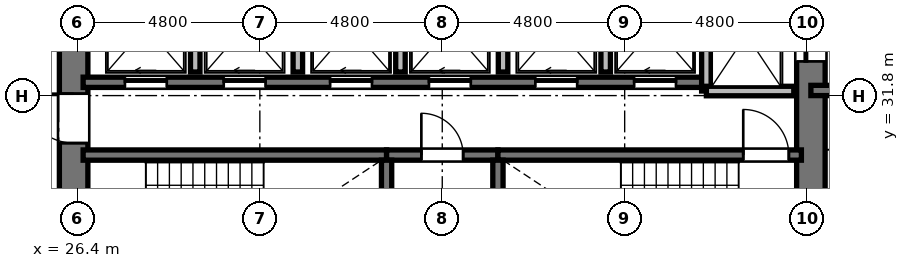
"""IFC4 building model, lengths in metres.
Left out: names, types, materials, properties, quantities, classifications, styles, units other than length and angle.
Written with IfcOpenShell. Run it as: python <this file> out.ifc"""

import sys

from ifc_helpers import new_model, si_unit, direction, frame, frame_2d, origin, place, context, subcontext, project, spatial, rectangle, extrude, element, fill, save


model = new_model("IFC4")
c1 = context("Model", 3, precision=1e-05, world=origin(), true_north=direction((0.0, 1.0)))
c2 = subcontext(c1, "Body", "Model", "MODEL_VIEW")
j1 = project(units=[si_unit("LENGTHUNIT", "METRE"), si_unit("PLANEANGLEUNIT", "RADIAN")], contexts=[c1])
p1 = place(None, origin())
s1 = spatial("IfcSite", under=j1, at=p1, CompositionType="ELEMENT")
p2 = place(p1, origin())
s2 = spatial("IfcBuilding", under=s1, at=p2, CompositionType="ELEMENT")
p3 = place(p2, frame((0.0, 0.0, 103.632)))
s3 = spatial("IfcBuildingStorey", under=s2, at=p3, CompositionType="ELEMENT", Elevation=103.632)
p4 = place(p3, frame((26.3, 20.95, 0.0), z_axis=(0.0, 0.0, 1.0), x_axis=(0.0, 1.0, 0.0)))
e1 = element("IfcWall", 1, at=p4, inside=s3, PredefinedType="SHEAR", context=c2, shape_type="SweptSolid", body=[
    extrude(rectangle(XDim=14.1, YDim=0.75, at=frame_2d((7.05, 0.0))), origin(), (0.0, 0.0, 1.0), 3.648),
])
p5 = place(p4, frame((6.5, 0.0, 0.0)))
e2 = element("IfcOpeningElement", 2, at=p5, cuts=e1, PredefinedType="OPENING", context=c2, shape_type="SweptSolid", body=[
    extrude(rectangle(XDim=1.2, YDim=2.15, at=frame_2d((0.6, 1.075))), frame((0.0, 0.385, 0.0), z_axis=(0.0, -1.0, 0.0), x_axis=(1.0, 0.0, 0.0)), (0.0, 0.0, 1.0), 0.77),
])
p6 = place(p4, frame((9.6, 0.0, 0.0)))
e3 = element("IfcOpeningElement", 3, at=p6, cuts=e1, PredefinedType="OPENING", context=c2, shape_type="SweptSolid", body=[
    extrude(rectangle(XDim=1.3, YDim=2.2, at=frame_2d((0.65, 1.1))), frame((0.0, 0.385, 0.0), z_axis=(0.0, -1.0, 0.0), x_axis=(1.0, 0.0, 0.0)), (0.0, 0.0, 1.0), 0.77),
])
p7 = place(p4, frame((3.26, 0.0, 0.0)))
e4 = element("IfcOpeningElement", 4, at=p7, cuts=e1, PredefinedType="OPENING", context=c2, shape_type="SweptSolid", body=[
    extrude(rectangle(XDim=1.3, YDim=2.2, at=frame_2d((0.65, 1.1))), frame((0.0, 0.385, 0.0), z_axis=(0.0, -1.0, 0.0), x_axis=(1.0, 0.0, 0.0)), (0.0, 0.0, 1.0), 0.77),
])
p8 = place(p3, frame((45.7, 20.95, 0.0), z_axis=(0.0, 0.0, 1.0), x_axis=(0.0, 1.0, 0.0)))
e5 = element("IfcWall", 5, at=p8, inside=s3, PredefinedType="SHEAR", context=c2, shape_type="SweptSolid", body=[
    extrude(rectangle(XDim=14.1, YDim=0.75, at=frame_2d((7.05, 0.0))), origin(), (0.0, 0.0, 1.0), 3.648),
])
p9 = place(p8, frame((11.75, 0.0, 0.0)))
e6 = element("IfcOpeningElement", 6, at=p9, cuts=e5, PredefinedType="OPENING", context=c2, shape_type="SweptSolid", body=[
    extrude(rectangle(XDim=1.4, YDim=2.3, at=frame_2d((0.7, 1.15))), frame((0.0, 0.385, 0.0), z_axis=(0.0, -1.0, 0.0), x_axis=(1.0, 0.0, 0.0)), (0.0, 0.0, 1.0), 0.77),
])
p10 = place(p8, frame((0.95, 0.0, 0.0)))
e7 = element("IfcOpeningElement", 7, at=p10, cuts=e5, PredefinedType="OPENING", context=c2, shape_type="SweptSolid", body=[
    extrude(rectangle(XDim=1.4, YDim=2.3, at=frame_2d((0.7, 1.15))), frame((0.0, 0.385, 0.0), z_axis=(0.0, -1.0, 0.0), x_axis=(1.0, 0.0, 0.0)), (0.0, 0.0, 1.0), 0.77),
])
p11 = place(p3, frame((26.55, 30.235, 0.0), z_axis=(0.0, 0.0, 1.0), x_axis=(1.0, 0.0, 0.0)))
e8 = element("IfcWall", 8, at=p11, inside=s3, PredefinedType="SHEAR", context=c2, shape_type="SweptSolid", body=[
    extrude(rectangle(XDim=7.985, YDim=0.27, at=frame_2d((3.992, 0.0))), origin(), (0.0, 0.0, 1.0), 3.648),
])
p12 = place(p3, frame((34.535, 30.235, 0.0), z_axis=(0.0, 0.0, 1.0), x_axis=(1.0, 0.0, 0.0)))
e9 = element("IfcWall", 9, at=p12, inside=s3, PredefinedType="SHEAR", context=c2, shape_type="SweptSolid", body=[
    extrude(rectangle(XDim=2.93, YDim=0.27, at=frame_2d((1.465, 0.0))), origin(), (0.0, 0.0, 1.0), 3.648),
])
p13 = place(p12, frame((0.915, 0.0, 0.0)))
e10 = element("IfcOpeningElement", 10, at=p13, cuts=e9, PredefinedType="OPENING", context=c2, shape_type="SweptSolid", body=[
    extrude(rectangle(XDim=1.1, YDim=2.15, at=frame_2d((0.55, 1.075))), frame((0.0, 0.145, 0.0), z_axis=(0.0, -1.0, 0.0), x_axis=(1.0, 0.0, 0.0)), (0.0, 0.0, 1.0), 0.29),
])
p14 = place(p3, frame((37.465, 30.235, 0.0), z_axis=(0.0, 0.0, 1.0), x_axis=(1.0, 0.0, 0.0)))
e11 = element("IfcWall", 11, at=p14, inside=s3, PredefinedType="SHEAR", context=c2, shape_type="SweptSolid", body=[
    extrude(rectangle(XDim=7.985, YDim=0.27, at=frame_2d((3.992, 0.0))), origin(), (0.0, 0.0, 1.0), 3.648),
])
p15 = place(p14, frame((6.455, 0.0, 0.0)))
e12 = element("IfcOpeningElement", 12, at=p15, cuts=e11, PredefinedType="OPENING", context=c2, shape_type="SweptSolid", body=[
    extrude(rectangle(XDim=1.2, YDim=2.15, at=frame_2d((0.6, 1.075))), frame((0.0, 0.145, 0.0), z_axis=(0.0, -1.0, 0.0), x_axis=(1.0, 0.0, 0.0)), (0.0, 0.0, 1.0), 0.29),
])
for number, where, z_axis, x_axis in (
    (13, (34.535, 26.02, 0.0), (0.0, 0.0, 1.0), (0.0, 1.0, 0.0)),
    (14, (37.465, 26.02, 0.0), (0.0, 0.0, 1.0), (0.0, 1.0, 0.0)),
):
    element("IfcWall", number, at=place(p3, frame(where, z_axis=z_axis, x_axis=x_axis)), inside=s3, PredefinedType="SHEAR", context=c2, shape_type="SweptSolid", body=[
        extrude(rectangle(XDim=4.08, YDim=0.27, at=frame_2d((2.04, 0.0))), origin(), (0.0, 0.0, 1.0), 3.648),
    ])
p16 = place(p3, frame((26.55, 32.15, 0.0), z_axis=(0.0, 0.0, 1.0), x_axis=(1.0, 0.0, 0.0)))
e15 = element("IfcWall", 15, at=p16, inside=s3, PredefinedType="SHEAR", context=c2, shape_type="SweptSolid", body=[
    extrude(rectangle(XDim=16.4, YDim=0.27, at=frame_2d((8.2, 0.0))), origin(), (0.0, 0.0, 1.0), 3.648),
])
p17 = place(p16, frame((1.1, 0.0, 0.0)))
e16 = element("IfcOpeningElement", 16, at=p17, cuts=e15, PredefinedType="OPENING", context=c2, shape_type="SweptSolid", body=[
    extrude(rectangle(XDim=1.1, YDim=2.2, at=frame_2d((0.55, 1.1))), frame((0.0, 0.145, 0.0), z_axis=(0.0, -1.0, 0.0), x_axis=(1.0, 0.0, 0.0)), (0.0, 0.0, 1.0), 0.29),
])
p18 = place(p16, frame((3.7, 0.0, 0.0)))
e17 = element("IfcOpeningElement", 17, at=p18, cuts=e15, PredefinedType="OPENING", context=c2, shape_type="SweptSolid", body=[
    extrude(rectangle(XDim=1.1, YDim=2.2, at=frame_2d((0.55, 1.1))), frame((0.0, 0.145, 0.0), z_axis=(0.0, -1.0, 0.0), x_axis=(1.0, 0.0, 0.0)), (0.0, 0.0, 1.0), 0.29),
])
p19 = place(p16, frame((6.5, 0.0, 0.0)))
e18 = element("IfcOpeningElement", 18, at=p19, cuts=e15, PredefinedType="OPENING", context=c2, shape_type="SweptSolid", body=[
    extrude(rectangle(XDim=1.1, YDim=2.2, at=frame_2d((0.55, 1.1))), frame((0.0, 0.145, 0.0), z_axis=(0.0, -1.0, 0.0), x_axis=(1.0, 0.0, 0.0)), (0.0, 0.0, 1.0), 0.29),
])
p20 = place(p16, frame((9.1, 0.0, 0.0)))
e19 = element("IfcOpeningElement", 19, at=p20, cuts=e15, PredefinedType="OPENING", context=c2, shape_type="SweptSolid", body=[
    extrude(rectangle(XDim=1.1, YDim=2.2, at=frame_2d((0.55, 1.1))), frame((0.0, 0.145, 0.0), z_axis=(0.0, -1.0, 0.0), x_axis=(1.0, 0.0, 0.0)), (0.0, 0.0, 1.0), 0.29),
])
p21 = place(p16, frame((11.9, 0.0, 0.0)))
e20 = element("IfcOpeningElement", 20, at=p21, cuts=e15, PredefinedType="OPENING", context=c2, shape_type="SweptSolid", body=[
    extrude(rectangle(XDim=1.1, YDim=2.2, at=frame_2d((0.55, 1.1))), frame((0.0, 0.145, 0.0), z_axis=(0.0, -1.0, 0.0), x_axis=(1.0, 0.0, 0.0)), (0.0, 0.0, 1.0), 0.29),
])
p22 = place(p16, frame((14.5, 0.0, 0.0)))
e21 = element("IfcOpeningElement", 21, at=p22, cuts=e15, PredefinedType="OPENING", context=c2, shape_type="SweptSolid", body=[
    extrude(rectangle(XDim=1.1, YDim=2.2, at=frame_2d((0.55, 1.1))), frame((0.0, 0.145, 0.0), z_axis=(0.0, -1.0, 0.0), x_axis=(1.0, 0.0, 0.0)), (0.0, 0.0, 1.0), 0.29),
])
p23 = place(p3, frame((42.95, 31.92, 0.0), z_axis=(0.0, 0.0, 1.0), x_axis=(0.0, 1.0, 0.0)))
e22 = element("IfcWall", 22, at=p23, inside=s3, PredefinedType="SOLIDWALL", context=c2, shape_type="SweptSolid", body=[
    extrude(rectangle(XDim=3.18, YDim=0.25, at=frame_2d((1.59, 0.0))), origin(), (0.0, 0.0, 1.0), 3.428),
])
p24 = place(p3, frame((42.95, 31.92, 0.0), z_axis=(0.0, 0.0, 1.0), x_axis=(1.0, 0.0, 0.0)))
e23 = element("IfcWall", 23, at=p24, inside=s3, PredefinedType="SOLIDWALL", context=c2, shape_type="SweptSolid", body=[
    extrude(rectangle(XDim=2.3, YDim=0.25, at=frame_2d((1.15, 0.0))), origin(), (0.0, 0.0, 1.0), 3.428),
])
for number, where, z_axis, x_axis in (
    (24, (29.5, 32.42, 0.0), (0.0, 0.0, 1.0), (0.0, 1.0, 0.0)),
    (25, (32.2, 32.42, 0.0), (0.0, 0.0, 1.0), (0.0, 1.0, 0.0)),
    (26, (34.9, 32.42, 0.0), (0.0, 0.0, 1.0), (0.0, 1.0, 0.0)),
    (27, (37.6, 32.42, 0.0), (0.0, 0.0, 1.0), (0.0, 1.0, 0.0)),
    (28, (40.3, 32.42, 0.0), (0.0, 0.0, 1.0), (0.0, 1.0, 0.0)),
):
    element("IfcWall", number, at=place(p3, frame(where, z_axis=z_axis, x_axis=x_axis)), inside=s3, PredefinedType="SOLIDWALL", context=c2, shape_type="SweptSolid", body=[
        extrude(rectangle(XDim=2.68, YDim=0.25, at=frame_2d((1.34, 0.0))), origin(), (0.0, 0.0, 1.0), 3.428),
    ])
p25 = place(p3, frame((45.7, 31.935, 0.0), z_axis=(0.0, 0.0, 1.0), x_axis=(1.0, 0.0, 0.0)))
e29 = element("IfcWall", 29, at=p25, inside=s3, PredefinedType="SHEAR", context=c2, shape_type="SweptSolid", body=[
    extrude(rectangle(XDim=4.715, YDim=0.27, at=frame_2d((2.357, 0.0))), origin(), (0.0, 0.0, 1.0), 3.648),
])
p26 = place(p15, origin())
e30 = element("IfcDoor", 30, at=p26, inside=s3, OperationType="SINGLE_SWING_LEFT", PredefinedType="DOOR", context=c2, shape_type="SweptSolid", body=[
    extrude(rectangle(XDim=1.2, YDim=2.15, at=frame_2d((0.6, 1.075))), frame((0.0, 0.025, 0.0), z_axis=(0.0, -1.0, 0.0), x_axis=(1.0, 0.0, 0.0)), (0.0, 0.0, 1.0), 0.05),
])
fill(e12, e30)
p27 = place(p13, origin())
e31 = element("IfcDoor", 31, at=p27, inside=s3, OperationType="SINGLE_SWING_LEFT", PredefinedType="DOOR", context=c2, shape_type="SweptSolid", body=[
    extrude(rectangle(XDim=1.1, YDim=2.15, at=frame_2d((0.55, 1.075))), frame((0.0, 0.025, 0.0), z_axis=(0.0, -1.0, 0.0), x_axis=(1.0, 0.0, 0.0)), (0.0, 0.0, 1.0), 0.05),
])
fill(e10, e31)
p28 = place(p6, origin())
e32 = element("IfcDoor", 32, at=p28, inside=s3, OperationType="SINGLE_SWING_RIGHT", PredefinedType="DOOR", context=c2, shape_type="SweptSolid", body=[
    extrude(rectangle(XDim=1.3, YDim=2.2, at=frame_2d((0.65, 1.1))), frame((0.0, 0.025, 0.0), z_axis=(0.0, -1.0, 0.0), x_axis=(1.0, 0.0, 0.0)), (0.0, 0.0, 1.0), 0.05),
])
fill(e3, e32)
p29 = place(p17, origin())
e33 = element("IfcDoor", 33, at=p29, inside=s3, OperationType="SLIDING_TO_LEFT", PredefinedType="DOOR", context=c2, shape_type="SweptSolid", body=[
    extrude(rectangle(XDim=1.1, YDim=2.2, at=frame_2d((0.55, 1.1))), frame((0.0, 0.025, 0.0), z_axis=(0.0, -1.0, 0.0), x_axis=(1.0, 0.0, 0.0)), (0.0, 0.0, 1.0), 0.05),
])
fill(e16, e33)
p30 = place(p18, origin())
e34 = element("IfcDoor", 34, at=p30, inside=s3, OperationType="SLIDING_TO_LEFT", PredefinedType="DOOR", context=c2, shape_type="SweptSolid", body=[
    extrude(rectangle(XDim=1.1, YDim=2.2, at=frame_2d((0.55, 1.1))), frame((0.0, 0.025, 0.0), z_axis=(0.0, -1.0, 0.0), x_axis=(1.0, 0.0, 0.0)), (0.0, 0.0, 1.0), 0.05),
])
fill(e17, e34)
p31 = place(p19, origin())
e35 = element("IfcDoor", 35, at=p31, inside=s3, OperationType="SLIDING_TO_LEFT", PredefinedType="DOOR", context=c2, shape_type="SweptSolid", body=[
    extrude(rectangle(XDim=1.1, YDim=2.2, at=frame_2d((0.55, 1.1))), frame((0.0, 0.025, 0.0), z_axis=(0.0, -1.0, 0.0), x_axis=(1.0, 0.0, 0.0)), (0.0, 0.0, 1.0), 0.05),
])
fill(e18, e35)
p32 = place(p20, origin())
e36 = element("IfcDoor", 36, at=p32, inside=s3, OperationType="SLIDING_TO_LEFT", PredefinedType="DOOR", context=c2, shape_type="SweptSolid", body=[
    extrude(rectangle(XDim=1.1, YDim=2.2, at=frame_2d((0.55, 1.1))), frame((0.0, 0.025, 0.0), z_axis=(0.0, -1.0, 0.0), x_axis=(1.0, 0.0, 0.0)), (0.0, 0.0, 1.0), 0.05),
])
fill(e19, e36)
p33 = place(p21, origin())
e37 = element("IfcDoor", 37, at=p33, inside=s3, OperationType="SLIDING_TO_LEFT", PredefinedType="DOOR", context=c2, shape_type="SweptSolid", body=[
    extrude(rectangle(XDim=1.1, YDim=2.2, at=frame_2d((0.55, 1.1))), frame((0.0, 0.025, 0.0), z_axis=(0.0, -1.0, 0.0), x_axis=(1.0, 0.0, 0.0)), (0.0, 0.0, 1.0), 0.05),
])
fill(e20, e37)
p34 = place(p22, origin())
e38 = element("IfcDoor", 38, at=p34, inside=s3, OperationType="SLIDING_TO_LEFT", PredefinedType="DOOR", context=c2, shape_type="SweptSolid", body=[
    extrude(rectangle(XDim=1.1, YDim=2.2, at=frame_2d((0.55, 1.1))), frame((0.0, 0.025, 0.0), z_axis=(0.0, -1.0, 0.0), x_axis=(1.0, 0.0, 0.0)), (0.0, 0.0, 1.0), 0.05),
])
fill(e21, e38)
p35 = place(p9, origin())
e39 = element("IfcDoor", 39, at=p35, inside=s3, OperationType="SLIDING_TO_LEFT", PredefinedType="DOOR", context=c2, shape_type="SweptSolid", body=[
    extrude(rectangle(XDim=1.4, YDim=2.3, at=frame_2d((0.7, 1.15))), frame((0.0, 0.025, 0.0), z_axis=(0.0, -1.0, 0.0), x_axis=(1.0, 0.0, 0.0)), (0.0, 0.0, 1.0), 0.05),
])
fill(e6, e39)
save(model, sys.argv[1])
